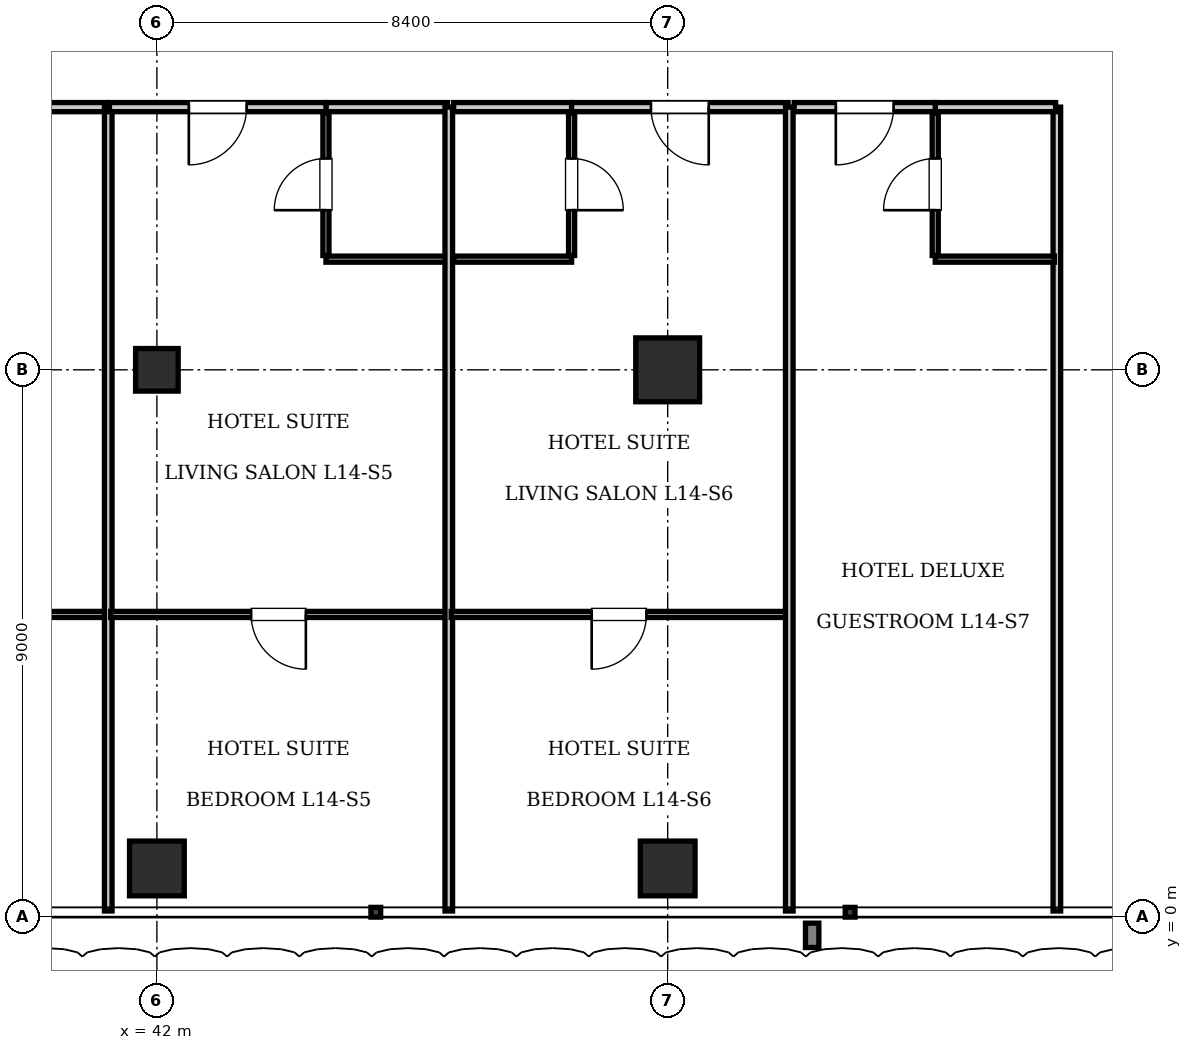
"""IFC4 building model, lengths in metres.
Left out: names, types, materials, properties, quantities, classifications, styles, units other than length and angle.
Written with IfcOpenShell. Run it as: python <this file> out.ifc"""

import sys

from ifc_helpers import new_model, si_unit, direction, frame, frame_2d, origin, origin_2d, place, context, subcontext, project, spatial, rectangle, i_section, extrude, element, fill, save


model = new_model("IFC4")
c1 = context("Model", 3, precision=1e-05, world=origin(), true_north=direction((0.0, 1.0)))
c2 = subcontext(c1, "Body", "Model", "MODEL_VIEW")
j1 = project(units=[si_unit("LENGTHUNIT", "METRE"), si_unit("PLANEANGLEUNIT", "RADIAN")], contexts=[c1])
p1 = place(None, origin())
s1 = spatial("IfcSite", under=j1, at=p1, CompositionType="ELEMENT")
p2 = place(p1, origin())
s2 = spatial("IfcBuilding", under=s1, at=p2, CompositionType="ELEMENT")
p3 = place(p2, frame((0.0, 0.0, 61.6)))
s3 = spatial("IfcBuildingStorey", under=s2, at=p3, CompositionType="ELEMENT", Elevation=61.6)
p4 = place(p3, frame((50.4, 9.0, 0.0), z_axis=(0.0, 0.0, 1.0), x_axis=(1.0, 0.0, 0.0)))
e1 = element("IfcColumn", 1, at=p4, inside=s3, PredefinedType="COLUMN", context=c2, shape_type="SweptSolid", body=[
    extrude(rectangle(XDim=1.05, YDim=1.05, at=origin_2d()), origin(), (0.0, 0.0, 1.0), 3.85),
])
p5 = place(p3, frame((42.0, 9.0, 0.0), z_axis=(0.0, 0.0, 1.0), x_axis=(1.0, 0.0, 0.0)))
e2 = element("IfcColumn", 2, at=p5, inside=s3, PredefinedType="COLUMN", context=c2, shape_type="SweptSolid", body=[
    extrude(i_section(OverallWidth=0.7, OverallDepth=0.7, WebThickness=0.028, FlangeThickness=0.044, at=origin_2d()), origin(), (0.0, 0.0, 1.0), 3.85),
])
for number, where, z_axis, x_axis in (
    (3, (42.0, 0.8, 0.0), (0.0, 0.0, 1.0), (1.0, 0.0, 0.0)),
    (4, (50.4, 0.8, 0.0), (0.0, 0.0, 1.0), (1.0, 0.0, 0.0)),
):
    element("IfcColumn", number, at=place(p3, frame(where, z_axis=z_axis, x_axis=x_axis)), inside=s3, PredefinedType="COLUMN", context=c2, shape_type="SweptSolid", body=[
        extrude(rectangle(XDim=0.9, YDim=0.9, at=origin_2d()), origin(), (0.0, 0.0, 1.0), 3.85),
    ])
p6 = place(p3, frame((56.8, 0.1, 0.0), z_axis=(0.0, 0.0, 1.0), x_axis=(0.0, 1.0, 0.0)))
e5 = element("IfcWall", 5, at=p6, inside=s3, PredefinedType="PARTITIONING", context=c2, shape_type="SweptSolid", body=[
    extrude(rectangle(XDim=13.22, YDim=0.125, at=frame_2d((6.61, 0.0))), origin(), (0.0, 0.0, 1.0), 3.61),
])
p7 = place(p3, frame((37.62, 13.32, 0.0), z_axis=(0.0, 0.0, 1.0), x_axis=(1.0, 0.0, 0.0)))
e6 = element("IfcWall", 6, at=p7, inside=s3, PredefinedType="PARTITIONING", context=c2, shape_type="SweptSolid", body=[
    extrude(rectangle(XDim=3.56, YDim=0.15, at=frame_2d((1.78, 0.0))), origin(), (0.0, 0.0, 1.0), 3.61),
])
p8 = place(p7, frame((1.305, 0.0, 0.0)))
e7 = element("IfcOpeningElement", 7, at=p8, cuts=e6, PredefinedType="OPENING", context=c2, shape_type="SweptSolid", body=[
    extrude(rectangle(XDim=0.95, YDim=2.15, at=frame_2d((0.475, 1.075))), frame((0.0, 0.085, 0.0), z_axis=(0.0, -1.0, 0.0), x_axis=(1.0, 0.0, 0.0)), (0.0, 0.0, 1.0), 0.17),
])
p9 = place(p3, frame((35.64, 4.977, 0.0), z_axis=(0.0, 0.0, 1.0), x_axis=(1.0, 0.0, 0.0)))
e8 = element("IfcWall", 8, at=p9, inside=s3, PredefinedType="PARTITIONING", context=c2, shape_type="SweptSolid", body=[
    extrude(rectangle(XDim=5.52, YDim=0.1, at=frame_2d((2.76, 0.0))), origin(), (0.0, 0.0, 1.0), 3.61),
])
p10 = place(p9, frame((2.31, 0.0, 0.0)))
e9 = element("IfcOpeningElement", 9, at=p10, cuts=e8, PredefinedType="OPENING", context=c2, shape_type="SweptSolid", body=[
    extrude(rectangle(XDim=0.9, YDim=2.1, at=frame_2d((0.45, 1.05))), frame((0.0, 0.06, 0.0), z_axis=(0.0, -1.0, 0.0), x_axis=(1.0, 0.0, 0.0)), (0.0, 0.0, 1.0), 0.12),
])
p11 = place(p3, frame((41.2, 0.1, 0.0), z_axis=(0.0, 0.0, 1.0), x_axis=(0.0, 1.0, 0.0)))
e10 = element("IfcWall", 10, at=p11, inside=s3, PredefinedType="PARTITIONING", context=c2, shape_type="SweptSolid", body=[
    extrude(rectangle(XDim=13.22, YDim=0.125, at=frame_2d((6.61, 0.0))), origin(), (0.0, 0.0, 1.0), 3.61),
])
p12 = place(p3, frame((44.78, 13.32, 0.0), z_axis=(0.0, 0.0, 1.0), x_axis=(1.0, 0.0, 0.0)))
e11 = element("IfcWall", 11, at=p12, inside=s3, PredefinedType="PARTITIONING", context=c2, shape_type="SweptSolid", body=[
    extrude(rectangle(XDim=2.0, YDim=0.15, at=frame_2d((1.0, 0.0))), origin(), (0.0, 0.0, 1.0), 3.61),
])
p13 = place(p3, frame((44.78, 10.82, 0.0), z_axis=(0.0, 0.0, 1.0), x_axis=(1.0, 0.0, 0.0)))
e12 = element("IfcWall", 12, at=p13, inside=s3, PredefinedType="PARTITIONING", context=c2, shape_type="SweptSolid", body=[
    extrude(rectangle(XDim=1.98, YDim=0.1, at=frame_2d((0.99, 0.0))), origin(), (0.0, 0.0, 1.0), 3.61),
])
p14 = place(p3, frame((44.78, 10.88, 0.0), z_axis=(0.0, 0.0, 1.0), x_axis=(0.0, 1.0, 0.0)))
e13 = element("IfcWall", 13, at=p14, inside=s3, PredefinedType="PARTITIONING", context=c2, shape_type="SweptSolid", body=[
    extrude(rectangle(XDim=2.34, YDim=0.1, at=frame_2d((1.17, 0.0))), origin(), (0.0, 0.0, 1.0), 3.61),
])
p15 = place(p14, frame((0.745, 0.0, 0.0)))
e14 = element("IfcOpeningElement", 14, at=p15, cuts=e13, PredefinedType="OPENING", context=c2, shape_type="SweptSolid", body=[
    extrude(rectangle(XDim=0.85, YDim=2.1, at=frame_2d((0.425, 1.05))), frame((0.0, 0.06, 0.0), z_axis=(0.0, -1.0, 0.0), x_axis=(1.0, 0.0, 0.0)), (0.0, 0.0, 1.0), 0.12),
])
p16 = place(p3, frame((41.22, 13.32, 0.0), z_axis=(0.0, 0.0, 1.0), x_axis=(1.0, 0.0, 0.0)))
e15 = element("IfcWall", 15, at=p16, inside=s3, PredefinedType="PARTITIONING", context=c2, shape_type="SweptSolid", body=[
    extrude(rectangle(XDim=3.56, YDim=0.15, at=frame_2d((1.78, 0.0))), origin(), (0.0, 0.0, 1.0), 3.61),
])
p17 = place(p16, frame((1.305, 0.0, 0.0)))
e16 = element("IfcOpeningElement", 16, at=p17, cuts=e15, PredefinedType="OPENING", context=c2, shape_type="SweptSolid", body=[
    extrude(rectangle(XDim=0.95, YDim=2.15, at=frame_2d((0.475, 1.075))), frame((0.0, 0.085, 0.0), z_axis=(0.0, -1.0, 0.0), x_axis=(1.0, 0.0, 0.0)), (0.0, 0.0, 1.0), 0.17),
])
p18 = place(p3, frame((41.24, 4.977, 0.0), z_axis=(0.0, 0.0, 1.0), x_axis=(1.0, 0.0, 0.0)))
e17 = element("IfcWall", 17, at=p18, inside=s3, PredefinedType="PARTITIONING", context=c2, shape_type="SweptSolid", body=[
    extrude(rectangle(XDim=5.52, YDim=0.1, at=frame_2d((2.76, 0.0))), origin(), (0.0, 0.0, 1.0), 3.61),
])
p19 = place(p18, frame((2.31, 0.0, 0.0)))
e18 = element("IfcOpeningElement", 18, at=p19, cuts=e17, PredefinedType="OPENING", context=c2, shape_type="SweptSolid", body=[
    extrude(rectangle(XDim=0.9, YDim=2.1, at=frame_2d((0.45, 1.05))), frame((0.0, 0.06, 0.0), z_axis=(0.0, -1.0, 0.0), x_axis=(1.0, 0.0, 0.0)), (0.0, 0.0, 1.0), 0.12),
])
p20 = place(p3, frame((46.8, 0.1, 0.0), z_axis=(0.0, 0.0, 1.0), x_axis=(0.0, 1.0, 0.0)))
e19 = element("IfcWall", 19, at=p20, inside=s3, PredefinedType="PARTITIONING", context=c2, shape_type="SweptSolid", body=[
    extrude(rectangle(XDim=13.22, YDim=0.125, at=frame_2d((6.61, 0.0))), origin(), (0.0, 0.0, 1.0), 3.61),
])
p21 = place(p3, frame((46.88, 13.32, 0.0), z_axis=(0.0, 0.0, 1.0), x_axis=(1.0, 0.0, 0.0)))
e20 = element("IfcWall", 20, at=p21, inside=s3, PredefinedType="PARTITIONING", context=c2, shape_type="SweptSolid", body=[
    extrude(rectangle(XDim=1.94, YDim=0.15, at=frame_2d((0.97, 0.0))), origin(), (0.0, 0.0, 1.0), 3.61),
])
p22 = place(p3, frame((46.88, 10.82, 0.0), z_axis=(0.0, 0.0, 1.0), x_axis=(1.0, 0.0, 0.0)))
e21 = element("IfcWall", 21, at=p22, inside=s3, PredefinedType="PARTITIONING", context=c2, shape_type="SweptSolid", body=[
    extrude(rectangle(XDim=1.94, YDim=0.1, at=frame_2d((0.97, 0.0))), origin(), (0.0, 0.0, 1.0), 3.61),
])
p23 = place(p3, frame((48.82, 10.88, 0.0), z_axis=(0.0, 0.0, 1.0), x_axis=(0.0, 1.0, 0.0)))
e22 = element("IfcWall", 22, at=p23, inside=s3, PredefinedType="PARTITIONING", context=c2, shape_type="SweptSolid", body=[
    extrude(rectangle(XDim=2.34, YDim=0.1, at=frame_2d((1.17, 0.0))), origin(), (0.0, 0.0, 1.0), 3.61),
])
p24 = place(p23, frame((0.745, 0.0, 0.0)))
e23 = element("IfcOpeningElement", 23, at=p24, cuts=e22, PredefinedType="OPENING", context=c2, shape_type="SweptSolid", body=[
    extrude(rectangle(XDim=0.85, YDim=2.1, at=frame_2d((0.425, 1.05))), frame((0.0, 0.06, 0.0), z_axis=(0.0, -1.0, 0.0), x_axis=(1.0, 0.0, 0.0)), (0.0, 0.0, 1.0), 0.12),
])
p25 = place(p3, frame((48.82, 13.32, 0.0), z_axis=(0.0, 0.0, 1.0), x_axis=(1.0, 0.0, 0.0)))
e24 = element("IfcWall", 24, at=p25, inside=s3, PredefinedType="PARTITIONING", context=c2, shape_type="SweptSolid", body=[
    extrude(rectangle(XDim=3.56, YDim=0.15, at=frame_2d((1.78, 0.0))), origin(), (0.0, 0.0, 1.0), 3.61),
])
p26 = place(p25, frame((1.305, 0.0, 0.0)))
e25 = element("IfcOpeningElement", 25, at=p26, cuts=e24, PredefinedType="OPENING", context=c2, shape_type="SweptSolid", body=[
    extrude(rectangle(XDim=0.95, YDim=2.15, at=frame_2d((0.475, 1.075))), frame((0.0, 0.085, 0.0), z_axis=(0.0, -1.0, 0.0), x_axis=(1.0, 0.0, 0.0)), (0.0, 0.0, 1.0), 0.17),
])
p27 = place(p3, frame((46.84, 4.977, 0.0), z_axis=(0.0, 0.0, 1.0), x_axis=(1.0, 0.0, 0.0)))
e26 = element("IfcWall", 26, at=p27, inside=s3, PredefinedType="PARTITIONING", context=c2, shape_type="SweptSolid", body=[
    extrude(rectangle(XDim=5.52, YDim=0.1, at=frame_2d((2.76, 0.0))), origin(), (0.0, 0.0, 1.0), 3.61),
])
p28 = place(p27, frame((2.31, 0.0, 0.0)))
e27 = element("IfcOpeningElement", 27, at=p28, cuts=e26, PredefinedType="OPENING", context=c2, shape_type="SweptSolid", body=[
    extrude(rectangle(XDim=0.9, YDim=2.1, at=frame_2d((0.45, 1.05))), frame((0.0, 0.06, 0.0), z_axis=(0.0, -1.0, 0.0), x_axis=(1.0, 0.0, 0.0)), (0.0, 0.0, 1.0), 0.12),
])
p29 = place(p3, frame((52.4, 0.1, 0.0), z_axis=(0.0, 0.0, 1.0), x_axis=(0.0, 1.0, 0.0)))
e28 = element("IfcWall", 28, at=p29, inside=s3, PredefinedType="PARTITIONING", context=c2, shape_type="SweptSolid", body=[
    extrude(rectangle(XDim=13.22, YDim=0.125, at=frame_2d((6.61, 0.0))), origin(), (0.0, 0.0, 1.0), 3.61),
])
p30 = place(p3, frame((54.8, 13.32, 0.0), z_axis=(0.0, 0.0, 1.0), x_axis=(1.0, 0.0, 0.0)))
e29 = element("IfcWall", 29, at=p30, inside=s3, PredefinedType="PARTITIONING", context=c2, shape_type="SweptSolid", body=[
    extrude(rectangle(XDim=1.98, YDim=0.15, at=frame_2d((0.99, 0.0))), origin(), (0.0, 0.0, 1.0), 3.61),
])
p31 = place(p3, frame((54.8, 10.82, 0.0), z_axis=(0.0, 0.0, 1.0), x_axis=(1.0, 0.0, 0.0)))
e30 = element("IfcWall", 30, at=p31, inside=s3, PredefinedType="PARTITIONING", context=c2, shape_type="SweptSolid", body=[
    extrude(rectangle(XDim=1.96, YDim=0.1, at=frame_2d((0.98, 0.0))), origin(), (0.0, 0.0, 1.0), 3.61),
])
p32 = place(p3, frame((54.8, 10.88, 0.0), z_axis=(0.0, 0.0, 1.0), x_axis=(0.0, 1.0, 0.0)))
e31 = element("IfcWall", 31, at=p32, inside=s3, PredefinedType="PARTITIONING", context=c2, shape_type="SweptSolid", body=[
    extrude(rectangle(XDim=2.34, YDim=0.1, at=frame_2d((1.17, 0.0))), origin(), (0.0, 0.0, 1.0), 3.61),
])
p33 = place(p32, frame((0.745, 0.0, 0.0)))
e32 = element("IfcOpeningElement", 32, at=p33, cuts=e31, PredefinedType="OPENING", context=c2, shape_type="SweptSolid", body=[
    extrude(rectangle(XDim=0.85, YDim=2.1, at=frame_2d((0.425, 1.05))), frame((0.0, 0.06, 0.0), z_axis=(0.0, -1.0, 0.0), x_axis=(1.0, 0.0, 0.0)), (0.0, 0.0, 1.0), 0.12),
])
p34 = place(p3, frame((52.48, 13.32, 0.0), z_axis=(0.0, 0.0, 1.0), x_axis=(1.0, 0.0, 0.0)))
e33 = element("IfcWall", 33, at=p34, inside=s3, PredefinedType="PARTITIONING", context=c2, shape_type="SweptSolid", body=[
    extrude(rectangle(XDim=2.32, YDim=0.15, at=frame_2d((1.16, 0.0))), origin(), (0.0, 0.0, 1.0), 3.61),
])
p35 = place(p34, frame((0.685, 0.0, 0.0)))
e34 = element("IfcOpeningElement", 34, at=p35, cuts=e33, PredefinedType="OPENING", context=c2, shape_type="SweptSolid", body=[
    extrude(rectangle(XDim=0.95, YDim=2.15, at=frame_2d((0.475, 1.075))), frame((0.0, 0.085, 0.0), z_axis=(0.0, -1.0, 0.0), x_axis=(1.0, 0.0, 0.0)), (0.0, 0.0, 1.0), 0.17),
])
p36 = place(p15, origin())
e35 = element("IfcDoor", 35, at=p36, inside=s3, OperationType="SINGLE_SWING_LEFT", PredefinedType="DOOR", context=c2, shape_type="SweptSolid", body=[
    extrude(rectangle(XDim=0.85, YDim=2.1, at=frame_2d((0.425, 1.05))), frame((0.0, 0.025, 0.0), z_axis=(0.0, -1.0, 0.0), x_axis=(1.0, 0.0, 0.0)), (0.0, 0.0, 1.0), 0.05),
])
fill(e14, e35)
p37 = place(p17, frame((0.95, 0.0, 0.0), z_axis=(0.0, 0.0, 1.0), x_axis=(-1.0, 0.0, 0.0)))
e36 = element("IfcDoor", 36, at=p37, inside=s3, OperationType="SINGLE_SWING_RIGHT", PredefinedType="DOOR", context=c2, shape_type="SweptSolid", body=[
    extrude(rectangle(XDim=0.95, YDim=2.15, at=frame_2d((0.475, 1.075))), frame((0.0, 0.025, 0.0), z_axis=(0.0, -1.0, 0.0), x_axis=(1.0, 0.0, 0.0)), (0.0, 0.0, 1.0), 0.05),
])
fill(e16, e36)
p38 = place(p19, frame((0.9, 0.0, 0.0), z_axis=(0.0, 0.0, 1.0), x_axis=(-1.0, 0.0, 0.0)))
e37 = element("IfcDoor", 37, at=p38, inside=s3, OperationType="SINGLE_SWING_LEFT", PredefinedType="DOOR", context=c2, shape_type="SweptSolid", body=[
    extrude(rectangle(XDim=0.9, YDim=2.1, at=frame_2d((0.45, 1.05))), frame((0.0, 0.025, 0.0), z_axis=(0.0, -1.0, 0.0), x_axis=(1.0, 0.0, 0.0)), (0.0, 0.0, 1.0), 0.05),
])
fill(e18, e37)
p39 = place(p24, frame((0.85, 0.0, 0.0), z_axis=(0.0, 0.0, 1.0), x_axis=(-1.0, 0.0, 0.0)))
e38 = element("IfcDoor", 38, at=p39, inside=s3, OperationType="SINGLE_SWING_RIGHT", PredefinedType="DOOR", context=c2, shape_type="SweptSolid", body=[
    extrude(rectangle(XDim=0.85, YDim=2.1, at=frame_2d((0.425, 1.05))), frame((0.0, 0.025, 0.0), z_axis=(0.0, -1.0, 0.0), x_axis=(1.0, 0.0, 0.0)), (0.0, 0.0, 1.0), 0.05),
])
fill(e23, e38)
p40 = place(p26, frame((0.95, 0.0, 0.0), z_axis=(0.0, 0.0, 1.0), x_axis=(-1.0, 0.0, 0.0)))
e39 = element("IfcDoor", 39, at=p40, inside=s3, OperationType="SINGLE_SWING_LEFT", PredefinedType="DOOR", context=c2, shape_type="SweptSolid", body=[
    extrude(rectangle(XDim=0.95, YDim=2.15, at=frame_2d((0.475, 1.075))), frame((0.0, 0.025, 0.0), z_axis=(0.0, -1.0, 0.0), x_axis=(1.0, 0.0, 0.0)), (0.0, 0.0, 1.0), 0.05),
])
fill(e25, e39)
p41 = place(p28, frame((0.9, 0.0, 0.0), z_axis=(0.0, 0.0, 1.0), x_axis=(-1.0, 0.0, 0.0)))
e40 = element("IfcDoor", 40, at=p41, inside=s3, OperationType="SINGLE_SWING_RIGHT", PredefinedType="DOOR", context=c2, shape_type="SweptSolid", body=[
    extrude(rectangle(XDim=0.9, YDim=2.1, at=frame_2d((0.45, 1.05))), frame((0.0, 0.025, 0.0), z_axis=(0.0, -1.0, 0.0), x_axis=(1.0, 0.0, 0.0)), (0.0, 0.0, 1.0), 0.05),
])
fill(e27, e40)
p42 = place(p33, origin())
e41 = element("IfcDoor", 41, at=p42, inside=s3, OperationType="SINGLE_SWING_LEFT", PredefinedType="DOOR", context=c2, shape_type="SweptSolid", body=[
    extrude(rectangle(XDim=0.85, YDim=2.1, at=frame_2d((0.425, 1.05))), frame((0.0, 0.025, 0.0), z_axis=(0.0, -1.0, 0.0), x_axis=(1.0, 0.0, 0.0)), (0.0, 0.0, 1.0), 0.05),
])
fill(e32, e41)
p43 = place(p35, frame((0.95, 0.0, 0.0), z_axis=(0.0, 0.0, 1.0), x_axis=(-1.0, 0.0, 0.0)))
e42 = element("IfcDoor", 42, at=p43, inside=s3, OperationType="SINGLE_SWING_RIGHT", PredefinedType="DOOR", context=c2, shape_type="SweptSolid", body=[
    extrude(rectangle(XDim=0.95, YDim=2.15, at=frame_2d((0.475, 1.075))), frame((0.0, 0.025, 0.0), z_axis=(0.0, -1.0, 0.0), x_axis=(1.0, 0.0, 0.0)), (0.0, 0.0, 1.0), 0.05),
])
fill(e34, e42)
save(model, sys.argv[1])
